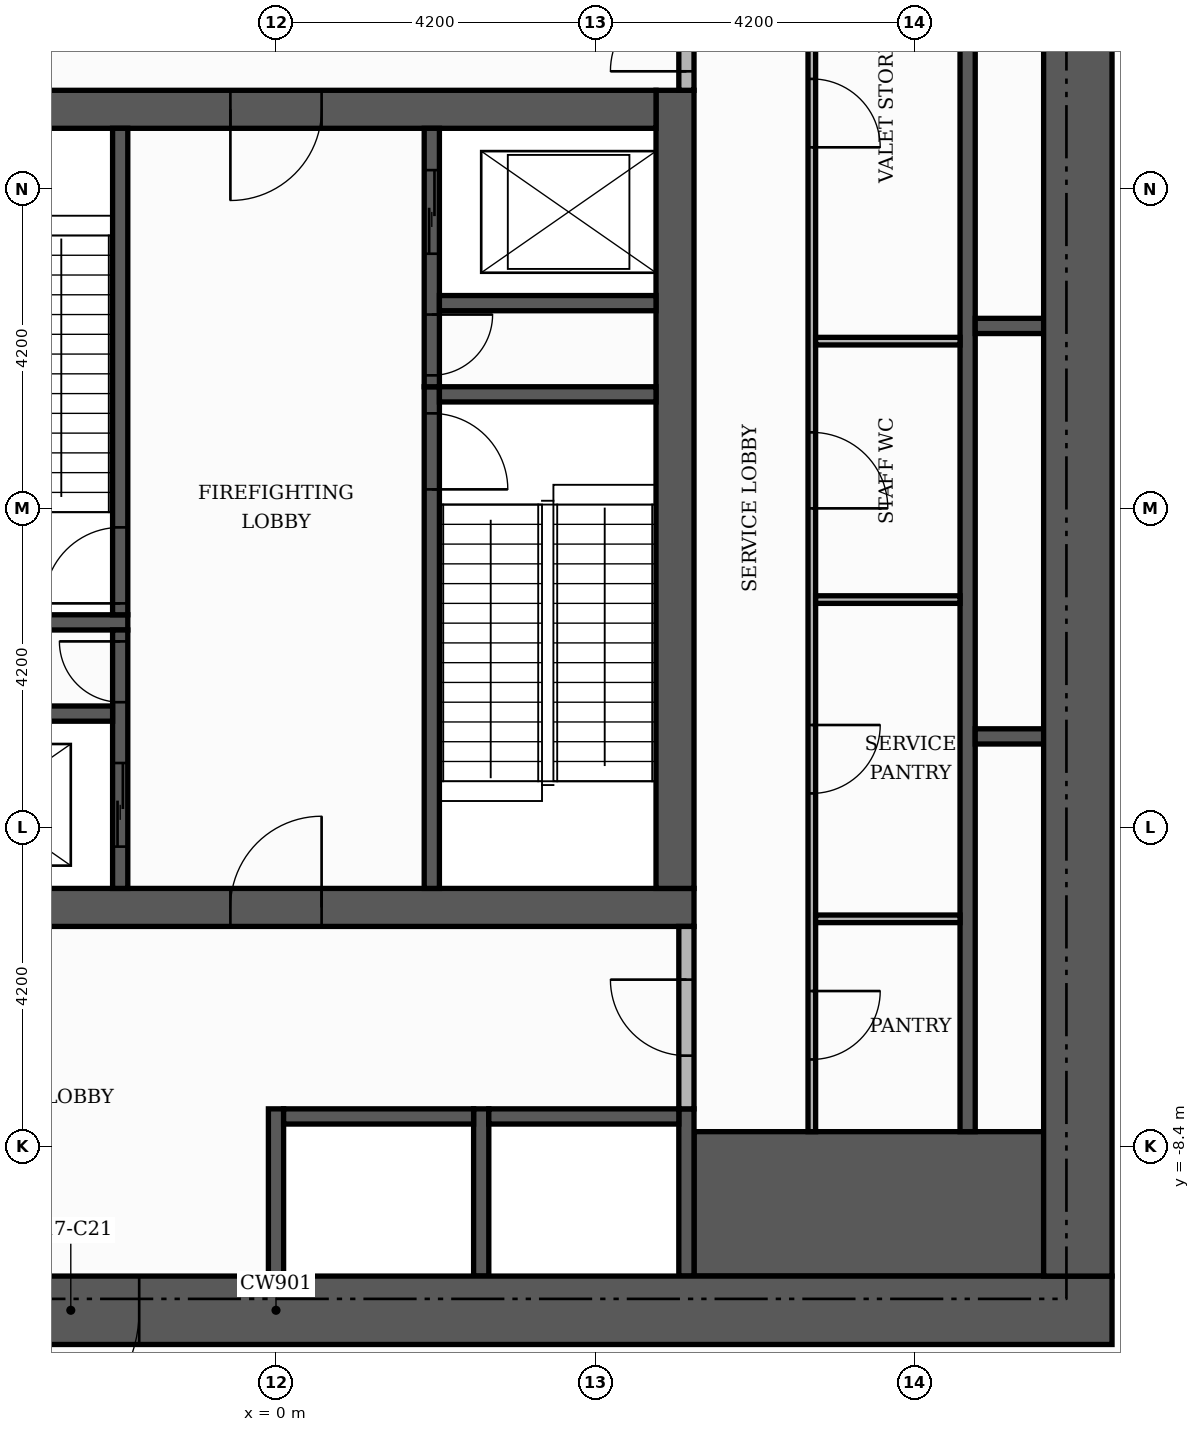
"""IFC4 building model, lengths in metres.
Left out: names, types, materials, properties, quantities, classifications, styles, units other than length and angle.
Written with IfcOpenShell. Run it as: python <this file> out.ifc"""

import sys

from ifc_helpers import new_model, si_unit, direction, frame, frame_2d, origin, place, context, subcontext, project, spatial, rectangle, extrude, element, fill, save


model = new_model("IFC4")
c1 = context("Model", 3, precision=1e-05, world=origin(), true_north=direction((0.0, 1.0)))
c2 = subcontext(c1, "Body", "Model", "MODEL_VIEW")
j1 = project(units=[si_unit("LENGTHUNIT", "METRE"), si_unit("PLANEANGLEUNIT", "RADIAN")], contexts=[c1])
p1 = place(None, origin())
s1 = spatial("IfcSite", under=j1, at=p1, CompositionType="ELEMENT")
p2 = place(p1, origin())
s2 = spatial("IfcBuilding", under=s1, at=p2, CompositionType="ELEMENT")
p3 = place(p2, frame((0.0, 0.0, 73.8)))
s3 = spatial("IfcBuildingStorey", under=s2, at=p3, CompositionType="ELEMENT", Elevation=73.8)
p4 = place(p3, frame((-5.5, -5.25, 0.0), z_axis=(0.0, 0.0, 1.0), x_axis=(1.0, 0.0, 0.0)))
e1 = element("IfcWall", 1, at=p4, inside=s3, PredefinedType="SHEAR", context=c2, shape_type="SweptSolid", body=[
    extrude(rectangle(XDim=11.0, YDim=0.5, at=frame_2d((5.5, 0.0))), origin(), (0.0, 0.0, 1.0), 4.98),
])
p5 = place(p4, frame((4.9, 0.0, 0.0)))
e2 = element("IfcOpeningElement", 2, at=p5, cuts=e1, PredefinedType="OPENING", context=c2, shape_type="SweptSolid", body=[
    extrude(rectangle(XDim=1.2, YDim=2.1, at=frame_2d((0.6, 1.05))), frame((0.0, 0.26, 0.0), z_axis=(0.0, -1.0, 0.0), x_axis=(1.0, 0.0, 0.0)), (0.0, 0.0, 1.0), 0.52),
])
p6 = place(p3, frame((5.25, -5.0, 0.0), z_axis=(0.0, 0.0, 1.0), x_axis=(0.0, 1.0, 0.0)))
e3 = element("IfcWall", 3, at=p6, inside=s3, PredefinedType="SHEAR", context=c2, shape_type="SweptSolid", body=[
    extrude(rectangle(XDim=10.5, YDim=0.5, at=frame_2d((5.25, 0.0))), origin(), (0.0, 0.0, 1.0), 4.98),
])
p7 = place(p3, frame((-5.0, 5.25, 0.0), z_axis=(0.0, 0.0, 1.0), x_axis=(1.0, 0.0, 0.0)))
e4 = element("IfcWall", 4, at=p7, inside=s3, PredefinedType="SHEAR", context=c2, shape_type="SweptSolid", body=[
    extrude(rectangle(XDim=10.0, YDim=0.5, at=frame_2d((5.0, 0.0))), origin(), (0.0, 0.0, 1.0), 4.98),
])
p8 = place(p7, frame((4.4, 0.0, 0.0)))
e5 = element("IfcOpeningElement", 5, at=p8, cuts=e4, PredefinedType="OPENING", context=c2, shape_type="SweptSolid", body=[
    extrude(rectangle(XDim=1.2, YDim=2.1, at=frame_2d((0.6, 1.05))), frame((0.0, 0.26, 0.0), z_axis=(0.0, -1.0, 0.0), x_axis=(1.0, 0.0, 0.0)), (0.0, 0.0, 1.0), 0.52),
])
p9 = place(p3, frame((5.5, -9.15, 0.0), z_axis=(0.0, 0.0, 1.0), x_axis=(1.0, 0.0, 0.0)))
e6 = element("IfcWall", 6, at=p9, inside=s3, PredefinedType="SHEAR", context=c2, shape_type="SweptSolid", body=[
    extrude(rectangle(XDim=4.6, YDim=1.9, at=frame_2d((2.3, 0.0))), origin(), (0.0, 0.0, 1.0), 4.98),
])
p10 = place(p3, frame((2.05, -5.0, 0.0), z_axis=(0.0, 0.0, 1.0), x_axis=(0.0, 1.0, 0.0)))
e7 = element("IfcWall", 7, at=p10, inside=s3, PredefinedType="SHEAR", context=c2, shape_type="SweptSolid", body=[
    extrude(rectangle(XDim=6.6, YDim=0.2, at=frame_2d((3.3, 0.0))), origin(), (0.0, 0.0, 1.0), 4.98),
])
p11 = place(p10, frame((5.25, 0.0, 0.0)))
e8 = element("IfcOpeningElement", 8, at=p11, cuts=e7, PredefinedType="OPENING", context=c2, shape_type="SweptSolid", body=[
    extrude(rectangle(XDim=1.0, YDim=2.1, at=frame_2d((0.5, 1.05))), frame((0.0, 0.11, 0.0), z_axis=(0.0, -1.0, 0.0), x_axis=(1.0, 0.0, 0.0)), (0.0, 0.0, 1.0), 0.22),
])
p12 = place(p3, frame((-5.0, -1.5, 0.0), z_axis=(0.0, 0.0, 1.0), x_axis=(1.0, 0.0, 0.0)))
e9 = element("IfcWall", 9, at=p12, inside=s3, PredefinedType="SHEAR", context=c2, shape_type="SweptSolid", body=[
    extrude(rectangle(XDim=3.05, YDim=0.2, at=frame_2d((1.525, 0.0))), origin(), (0.0, 0.0, 1.0), 4.98),
])
p13 = place(p3, frame((-2.05, -1.4, 0.0), z_axis=(0.0, 0.0, 1.0), x_axis=(0.0, 1.0, 0.0)))
e10 = element("IfcWall", 10, at=p13, inside=s3, PredefinedType="SHEAR", context=c2, shape_type="SweptSolid", body=[
    extrude(rectangle(XDim=6.4, YDim=0.2, at=frame_2d((3.2, 0.0))), origin(), (0.0, 0.0, 1.0), 4.98),
])
p14 = place(p13, frame((0.15, 0.0, 0.0)))
e11 = element("IfcOpeningElement", 11, at=p14, cuts=e10, PredefinedType="OPENING", context=c2, shape_type="SweptSolid", body=[
    extrude(rectangle(XDim=1.0, YDim=2.1, at=frame_2d((0.5, 1.05))), frame((0.0, 0.11, 0.0), z_axis=(0.0, -1.0, 0.0), x_axis=(1.0, 0.0, 0.0)), (0.0, 0.0, 1.0), 0.22),
])
p15 = place(p3, frame((2.15, 1.5, 0.0), z_axis=(0.0, 0.0, 1.0), x_axis=(1.0, 0.0, 0.0)))
e12 = element("IfcWall", 12, at=p15, inside=s3, PredefinedType="SHEAR", context=c2, shape_type="SweptSolid", body=[
    extrude(rectangle(XDim=2.85, YDim=0.2, at=frame_2d((1.425, 0.0))), origin(), (0.0, 0.0, 1.0), 4.98),
])
for number, where, z_axis, x_axis in (
    (13, (0.0, -10.1, 0.0), (0.0, 0.0, 1.0), (0.0, 1.0, 0.0)),
    (14, (2.7, -10.1, 0.0), (0.0, 0.0, 1.0), (0.0, 1.0, 0.0)),
    (15, (5.4, -10.1, 0.0), (0.0, 0.0, 1.0), (0.0, 1.0, 0.0)),
):
    element("IfcWall", number, at=place(p3, frame(where, z_axis=z_axis, x_axis=x_axis)), inside=s3, PredefinedType="SHEAR", context=c2, shape_type="SweptSolid", body=[
        extrude(rectangle(XDim=2.2, YDim=0.2, at=frame_2d((1.1, 0.0))), origin(), (0.0, 0.0, 1.0), 4.98),
    ])
p16 = place(p3, frame((9.1, -8.2, 0.0), z_axis=(0.0, 0.0, 1.0), x_axis=(0.0, 1.0, 0.0)))
e16 = element("IfcWall", 16, at=p16, inside=s3, PredefinedType="SHEAR", context=c2, shape_type="SweptSolid", body=[
    extrude(rectangle(XDim=16.4, YDim=0.2, at=frame_2d((8.2, 0.0))), origin(), (0.0, 0.0, 1.0), 4.98),
])
for number, where, z_axis, x_axis in (
    (17, (0.1, -8.0, 0.0), (0.0, 0.0, 1.0), (1.0, 0.0, 0.0)),
    (18, (2.8, -8.0, 0.0), (0.0, 0.0, 1.0), (1.0, 0.0, 0.0)),
):
    element("IfcWall", number, at=place(p3, frame(where, z_axis=z_axis, x_axis=x_axis)), inside=s3, PredefinedType="SHEAR", context=c2, shape_type="SweptSolid", body=[
        extrude(rectangle(XDim=2.5, YDim=0.2, at=frame_2d((1.25, 0.0))), origin(), (0.0, 0.0, 1.0), 4.98),
    ])
p17 = place(p3, frame((-2.05, -5.0, 0.0), z_axis=(0.0, 0.0, 1.0), x_axis=(0.0, 1.0, 0.0)))
e19 = element("IfcWall", 19, at=p17, inside=s3, PredefinedType="SHEAR", context=c2, shape_type="SweptSolid", body=[
    extrude(rectangle(XDim=3.4, YDim=0.2, at=frame_2d((1.7, 0.0))), origin(), (0.0, 0.0, 1.0), 4.98),
])
p18 = place(p17, frame((0.55, 0.0, 0.0)))
e20 = element("IfcOpeningElement", 20, at=p18, cuts=e19, PredefinedType="OPENING", context=c2, shape_type="SweptSolid", body=[
    extrude(rectangle(XDim=1.1, YDim=2.1, at=frame_2d((0.55, 1.05))), frame((0.0, 0.11, 0.0), z_axis=(0.0, -1.0, 0.0), x_axis=(1.0, 0.0, 0.0)), (0.0, 0.0, 1.0), 0.22),
])
p19 = place(p17, frame((2.45, 0.0, 0.0)))
e21 = element("IfcOpeningElement", 21, at=p19, cuts=e19, PredefinedType="OPENING", context=c2, shape_type="SweptSolid", body=[
    extrude(rectangle(XDim=0.8, YDim=2.1, at=frame_2d((0.4, 1.05))), frame((0.0, 0.11, 0.0), z_axis=(0.0, -1.0, 0.0), x_axis=(1.0, 0.0, 0.0)), (0.0, 0.0, 1.0), 0.22),
])
p20 = place(p3, frame((9.2, -3.0, 0.0), z_axis=(0.0, 0.0, 1.0), x_axis=(1.0, 0.0, 0.0)))
e22 = element("IfcWall", 22, at=p20, inside=s3, PredefinedType="SHEAR", context=c2, shape_type="SweptSolid", body=[
    extrude(rectangle(XDim=0.9, YDim=0.2, at=frame_2d((0.45, 0.0))), origin(), (0.0, 0.0, 1.0), 4.98),
])
p21 = place(p3, frame((-5.0, -2.7, 0.0), z_axis=(0.0, 0.0, 1.0), x_axis=(1.0, 0.0, 0.0)))
e23 = element("IfcWall", 23, at=p21, inside=s3, PredefinedType="SHEAR", context=c2, shape_type="SweptSolid", body=[
    extrude(rectangle(XDim=2.85, YDim=0.2, at=frame_2d((1.425, 0.0))), origin(), (0.0, 0.0, 1.0), 4.98),
])
p22 = place(p3, frame((2.05, 1.6, 0.0), z_axis=(0.0, 0.0, 1.0), x_axis=(0.0, 1.0, 0.0)))
e24 = element("IfcWall", 24, at=p22, inside=s3, PredefinedType="SHEAR", context=c2, shape_type="SweptSolid", body=[
    extrude(rectangle(XDim=3.4, YDim=0.2, at=frame_2d((1.7, 0.0))), origin(), (0.0, 0.0, 1.0), 4.98),
])
p23 = place(p22, frame((1.75, 0.0, 0.0)))
e25 = element("IfcOpeningElement", 25, at=p23, cuts=e24, PredefinedType="OPENING", context=c2, shape_type="SweptSolid", body=[
    extrude(rectangle(XDim=1.1, YDim=2.1, at=frame_2d((0.55, 1.05))), frame((0.0, 0.11, 0.0), z_axis=(0.0, -1.0, 0.0), x_axis=(1.0, 0.0, 0.0)), (0.0, 0.0, 1.0), 0.22),
])
p24 = place(p22, frame((0.15, 0.0, 0.0)))
e26 = element("IfcOpeningElement", 26, at=p24, cuts=e24, PredefinedType="OPENING", context=c2, shape_type="SweptSolid", body=[
    extrude(rectangle(XDim=0.8, YDim=2.1, at=frame_2d((0.4, 1.05))), frame((0.0, 0.11, 0.0), z_axis=(0.0, -1.0, 0.0), x_axis=(1.0, 0.0, 0.0)), (0.0, 0.0, 1.0), 0.22),
])
p25 = place(p3, frame((9.2, 2.4, 0.0), z_axis=(0.0, 0.0, 1.0), x_axis=(1.0, 0.0, 0.0)))
e27 = element("IfcWall", 27, at=p25, inside=s3, PredefinedType="SHEAR", context=c2, shape_type="SweptSolid", body=[
    extrude(rectangle(XDim=0.9, YDim=0.2, at=frame_2d((0.45, 0.0))), origin(), (0.0, 0.0, 1.0), 4.98),
])
p26 = place(p3, frame((2.15, 2.7, 0.0), z_axis=(0.0, 0.0, 1.0), x_axis=(1.0, 0.0, 0.0)))
e28 = element("IfcWall", 28, at=p26, inside=s3, PredefinedType="SHEAR", context=c2, shape_type="SweptSolid", body=[
    extrude(rectangle(XDim=2.85, YDim=0.2, at=frame_2d((1.425, 0.0))), origin(), (0.0, 0.0, 1.0), 4.98),
])
p27 = place(p3, frame((-11.0, -10.55, 0.0), z_axis=(0.0, 0.0, 1.0), x_axis=(1.0, 0.0, 0.0)))
e29 = element("IfcWall", 29, at=p27, inside=s3, PredefinedType="SHEAR", context=c2, shape_type="SweptSolid", body=[
    extrude(rectangle(XDim=22.0, YDim=0.9, at=frame_2d((11.0, 0.0))), origin(), (0.0, 0.0, 1.0), 4.98),
])
p28 = place(p27, frame((7.4, 0.0, 0.0)))
e30 = element("IfcOpeningElement", 30, at=p28, cuts=e29, PredefinedType="OPENING", context=c2, shape_type="SweptSolid", body=[
    extrude(rectangle(XDim=1.8, YDim=2.2, at=frame_2d((0.9, 1.1))), frame((0.0, 0.46, 0.0), z_axis=(0.0, -1.0, 0.0), x_axis=(1.0, 0.0, 0.0)), (0.0, 0.0, 1.0), 0.92),
])
p29 = place(p3, frame((10.55, -10.1, 0.0), z_axis=(0.0, 0.0, 1.0), x_axis=(0.0, 1.0, 0.0)))
e31 = element("IfcWall", 31, at=p29, inside=s3, PredefinedType="SHEAR", context=c2, shape_type="SweptSolid", body=[
    extrude(rectangle(XDim=20.2, YDim=0.9, at=frame_2d((10.1, 0.0))), origin(), (0.0, 0.0, 1.0), 4.98),
])
p30 = place(p3, frame((7.05, -8.2, 0.0), z_axis=(0.0, 0.0, 1.0), x_axis=(0.0, 1.0, 0.0)))
e32 = element("IfcWall", 32, at=p30, inside=s3, PredefinedType="PARTITIONING", context=c2, shape_type="SweptSolid", body=[
    extrude(rectangle(XDim=16.4, YDim=0.1, at=frame_2d((8.2, 0.0))), origin(), (0.0, 0.0, 1.0), 4.98),
])
p31 = place(p30, frame((0.95, 0.0, 0.0)))
e33 = element("IfcOpeningElement", 33, at=p31, cuts=e32, PredefinedType="OPENING", context=c2, shape_type="SweptSolid", body=[
    extrude(rectangle(XDim=0.9, YDim=2.1, at=frame_2d((0.45, 1.05))), frame((0.0, 0.06, 0.0), z_axis=(0.0, -1.0, 0.0), x_axis=(1.0, 0.0, 0.0)), (0.0, 0.0, 1.0), 0.12),
])
p32 = place(p30, frame((4.45, 0.0, 0.0)))
e34 = element("IfcOpeningElement", 34, at=p32, cuts=e32, PredefinedType="OPENING", context=c2, shape_type="SweptSolid", body=[
    extrude(rectangle(XDim=0.9, YDim=2.1, at=frame_2d((0.45, 1.05))), frame((0.0, 0.06, 0.0), z_axis=(0.0, -1.0, 0.0), x_axis=(1.0, 0.0, 0.0)), (0.0, 0.0, 1.0), 0.12),
])
p33 = place(p30, frame((8.2, 0.0, 0.0)))
e35 = element("IfcOpeningElement", 35, at=p33, cuts=e32, PredefinedType="OPENING", context=c2, shape_type="SweptSolid", body=[
    extrude(rectangle(XDim=1.0, YDim=2.1, at=frame_2d((0.5, 1.05))), frame((0.0, 0.06, 0.0), z_axis=(0.0, -1.0, 0.0), x_axis=(1.0, 0.0, 0.0)), (0.0, 0.0, 1.0), 0.12),
])
p34 = place(p30, frame((12.95, 0.0, 0.0)))
e36 = element("IfcOpeningElement", 36, at=p34, cuts=e32, PredefinedType="OPENING", context=c2, shape_type="SweptSolid", body=[
    extrude(rectangle(XDim=0.9, YDim=2.1, at=frame_2d((0.45, 1.05))), frame((0.0, 0.06, 0.0), z_axis=(0.0, -1.0, 0.0), x_axis=(1.0, 0.0, 0.0)), (0.0, 0.0, 1.0), 0.12),
])
p35 = place(p3, frame((5.4, -7.9, 0.0), z_axis=(0.0, 0.0, 1.0), x_axis=(0.0, 1.0, 0.0)))
e37 = element("IfcWall", 37, at=p35, inside=s3, PredefinedType="PARTITIONING", context=c2, shape_type="SweptSolid", body=[
    extrude(rectangle(XDim=2.4, YDim=0.2, at=frame_2d((1.2, 0.0))), origin(), (0.0, 0.0, 1.0), 4.98),
])
p36 = place(p35, frame((0.7, 0.0, 0.0)))
e38 = element("IfcOpeningElement", 38, at=p36, cuts=e37, PredefinedType="OPENING", context=c2, shape_type="SweptSolid", body=[
    extrude(rectangle(XDim=1.0, YDim=2.1, at=frame_2d((0.5, 1.05))), frame((0.0, 0.11, 0.0), z_axis=(0.0, -1.0, 0.0), x_axis=(1.0, 0.0, 0.0)), (0.0, 0.0, 1.0), 0.22),
])
for number, where, z_axis, x_axis in (
    (39, (7.1, -5.4, 0.0), (0.0, 0.0, 1.0), (1.0, 0.0, 0.0)),
    (40, (7.1, -1.2, 0.0), (0.0, 0.0, 1.0), (1.0, 0.0, 0.0)),
    (41, (7.1, 2.2, 0.0), (0.0, 0.0, 1.0), (1.0, 0.0, 0.0)),
):
    element("IfcWall", number, at=place(p3, frame(where, z_axis=z_axis, x_axis=x_axis)), inside=s3, PredefinedType="PARTITIONING", context=c2, shape_type="SweptSolid", body=[
        extrude(rectangle(XDim=1.9, YDim=0.1, at=frame_2d((0.95, 0.0))), origin(), (0.0, 0.0, 1.0), 4.98),
    ])
p37 = place(p3, frame((5.4, 5.5, 0.0), z_axis=(0.0, 0.0, 1.0), x_axis=(0.0, 1.0, 0.0)))
e42 = element("IfcWall", 42, at=p37, inside=s3, PredefinedType="PARTITIONING", context=c2, shape_type="SweptSolid", body=[
    extrude(rectangle(XDim=4.6, YDim=0.2, at=frame_2d((2.3, 0.0))), origin(), (0.0, 0.0, 1.0), 4.98),
])
p38 = place(p37, frame((0.25, 0.0, 0.0)))
e43 = element("IfcOpeningElement", 43, at=p38, cuts=e42, PredefinedType="OPENING", context=c2, shape_type="SweptSolid", body=[
    extrude(rectangle(XDim=1.0, YDim=2.1, at=frame_2d((0.5, 1.05))), frame((0.0, 0.11, 0.0), z_axis=(0.0, -1.0, 0.0), x_axis=(1.0, 0.0, 0.0)), (0.0, 0.0, 1.0), 0.22),
])
p39 = place(p23, origin())
e44 = element("IfcDoor", 44, at=p39, inside=s3, OperationType="SLIDING_TO_LEFT", PredefinedType="DOOR", context=c2, shape_type="SweptSolid", body=[
    extrude(rectangle(XDim=1.1, YDim=2.1, at=frame_2d((0.55, 1.05))), frame((0.0, 0.025, 0.0), z_axis=(0.0, -1.0, 0.0), x_axis=(1.0, 0.0, 0.0)), (0.0, 0.0, 1.0), 0.05),
])
fill(e25, e44)
p40 = place(p18, origin())
e45 = element("IfcDoor", 45, at=p40, inside=s3, OperationType="SLIDING_TO_LEFT", PredefinedType="DOOR", context=c2, shape_type="SweptSolid", body=[
    extrude(rectangle(XDim=1.1, YDim=2.1, at=frame_2d((0.55, 1.05))), frame((0.0, 0.025, 0.0), z_axis=(0.0, -1.0, 0.0), x_axis=(1.0, 0.0, 0.0)), (0.0, 0.0, 1.0), 0.05),
])
fill(e20, e45)
p41 = place(p14, origin())
e46 = element("IfcDoor", 46, at=p41, inside=s3, OperationType="SINGLE_SWING_LEFT", PredefinedType="DOOR", context=c2, shape_type="SweptSolid", body=[
    extrude(rectangle(XDim=1.0, YDim=2.1, at=frame_2d((0.5, 1.05))), frame((0.0, 0.025, 0.0), z_axis=(0.0, -1.0, 0.0), x_axis=(1.0, 0.0, 0.0)), (0.0, 0.0, 1.0), 0.05),
])
fill(e11, e46)
p42 = place(p11, frame((1.0, 0.0, 0.0), z_axis=(0.0, 0.0, 1.0), x_axis=(-1.0, 0.0, 0.0)))
e47 = element("IfcDoor", 47, at=p42, inside=s3, OperationType="SINGLE_SWING_LEFT", PredefinedType="DOOR", context=c2, shape_type="SweptSolid", body=[
    extrude(rectangle(XDim=1.0, YDim=2.1, at=frame_2d((0.5, 1.05))), frame((0.0, 0.025, 0.0), z_axis=(0.0, -1.0, 0.0), x_axis=(1.0, 0.0, 0.0)), (0.0, 0.0, 1.0), 0.05),
])
fill(e8, e47)
p43 = place(p24, frame((0.8, 0.0, 0.0), z_axis=(0.0, 0.0, 1.0), x_axis=(-1.0, 0.0, 0.0)))
e48 = element("IfcDoor", 48, at=p43, inside=s3, OperationType="SINGLE_SWING_RIGHT", PredefinedType="DOOR", context=c2, shape_type="SweptSolid", body=[
    extrude(rectangle(XDim=0.8, YDim=2.1, at=frame_2d((0.4, 1.05))), frame((0.0, 0.025, 0.0), z_axis=(0.0, -1.0, 0.0), x_axis=(1.0, 0.0, 0.0)), (0.0, 0.0, 1.0), 0.05),
])
fill(e26, e48)
p44 = place(p19, origin())
e49 = element("IfcDoor", 49, at=p44, inside=s3, OperationType="SINGLE_SWING_RIGHT", PredefinedType="DOOR", context=c2, shape_type="SweptSolid", body=[
    extrude(rectangle(XDim=0.8, YDim=2.1, at=frame_2d((0.4, 1.05))), frame((0.0, 0.025, 0.0), z_axis=(0.0, -1.0, 0.0), x_axis=(1.0, 0.0, 0.0)), (0.0, 0.0, 1.0), 0.05),
])
fill(e21, e49)
p45 = place(p8, frame((1.2, 0.0, 0.0), z_axis=(0.0, 0.0, 1.0), x_axis=(-1.0, 0.0, 0.0)))
e50 = element("IfcDoor", 50, at=p45, inside=s3, OperationType="SINGLE_SWING_LEFT", PredefinedType="DOOR", context=c2, shape_type="SweptSolid", body=[
    extrude(rectangle(XDim=1.2, YDim=2.1, at=frame_2d((0.6, 1.05))), frame((0.0, 0.025, 0.0), z_axis=(0.0, -1.0, 0.0), x_axis=(1.0, 0.0, 0.0)), (0.0, 0.0, 1.0), 0.05),
])
fill(e5, e50)
p46 = place(p5, origin())
e51 = element("IfcDoor", 51, at=p46, inside=s3, OperationType="SINGLE_SWING_RIGHT", PredefinedType="DOOR", context=c2, shape_type="SweptSolid", body=[
    extrude(rectangle(XDim=1.2, YDim=2.1, at=frame_2d((0.6, 1.05))), frame((0.0, 0.025, 0.0), z_axis=(0.0, -1.0, 0.0), x_axis=(1.0, 0.0, 0.0)), (0.0, 0.0, 1.0), 0.05),
])
fill(e2, e51)
p47 = place(p38, origin())
e52 = element("IfcDoor", 52, at=p47, inside=s3, OperationType="SINGLE_SWING_LEFT", PredefinedType="DOOR", context=c2, shape_type="SweptSolid", body=[
    extrude(rectangle(XDim=1.0, YDim=2.1, at=frame_2d((0.5, 1.05))), frame((0.0, 0.025, 0.0), z_axis=(0.0, -1.0, 0.0), x_axis=(1.0, 0.0, 0.0)), (0.0, 0.0, 1.0), 0.05),
])
fill(e43, e52)
p48 = place(p36, origin())
e53 = element("IfcDoor", 53, at=p48, inside=s3, OperationType="SINGLE_SWING_RIGHT", PredefinedType="DOOR", context=c2, shape_type="SweptSolid", body=[
    extrude(rectangle(XDim=1.0, YDim=2.1, at=frame_2d((0.5, 1.05))), frame((0.0, 0.025, 0.0), z_axis=(0.0, -1.0, 0.0), x_axis=(1.0, 0.0, 0.0)), (0.0, 0.0, 1.0), 0.05),
])
fill(e38, e53)
p49 = place(p28, frame((1.8, 0.0, 0.0), z_axis=(0.0, 0.0, 1.0), x_axis=(-1.0, 0.0, 0.0)))
e54 = element("IfcDoor", 54, at=p49, inside=s3, OperationType="DOUBLE_DOOR_SINGLE_SWING", PredefinedType="DOOR", context=c2, shape_type="SweptSolid", body=[
    extrude(rectangle(XDim=1.8, YDim=2.2, at=frame_2d((0.9, 1.1))), frame((0.0, 0.025, 0.0), z_axis=(0.0, -1.0, 0.0), x_axis=(1.0, 0.0, 0.0)), (0.0, 0.0, 1.0), 0.05),
])
fill(e30, e54)
p50 = place(p31, frame((0.9, 0.0, 0.0), z_axis=(0.0, 0.0, 1.0), x_axis=(-1.0, 0.0, 0.0)))
e55 = element("IfcDoor", 55, at=p50, inside=s3, OperationType="SINGLE_SWING_RIGHT", PredefinedType="DOOR", context=c2, shape_type="SweptSolid", body=[
    extrude(rectangle(XDim=0.9, YDim=2.1, at=frame_2d((0.45, 1.05))), frame((0.0, 0.025, 0.0), z_axis=(0.0, -1.0, 0.0), x_axis=(1.0, 0.0, 0.0)), (0.0, 0.0, 1.0), 0.05),
])
fill(e33, e55)
p51 = place(p32, frame((0.9, 0.0, 0.0), z_axis=(0.0, 0.0, 1.0), x_axis=(-1.0, 0.0, 0.0)))
e56 = element("IfcDoor", 56, at=p51, inside=s3, OperationType="SINGLE_SWING_RIGHT", PredefinedType="DOOR", context=c2, shape_type="SweptSolid", body=[
    extrude(rectangle(XDim=0.9, YDim=2.1, at=frame_2d((0.45, 1.05))), frame((0.0, 0.025, 0.0), z_axis=(0.0, -1.0, 0.0), x_axis=(1.0, 0.0, 0.0)), (0.0, 0.0, 1.0), 0.05),
])
fill(e34, e56)
p52 = place(p33, frame((1.0, 0.0, 0.0), z_axis=(0.0, 0.0, 1.0), x_axis=(-1.0, 0.0, 0.0)))
e57 = element("IfcDoor", 57, at=p52, inside=s3, OperationType="SINGLE_SWING_LEFT", PredefinedType="DOOR", context=c2, shape_type="SweptSolid", body=[
    extrude(rectangle(XDim=1.0, YDim=2.1, at=frame_2d((0.5, 1.05))), frame((0.0, 0.025, 0.0), z_axis=(0.0, -1.0, 0.0), x_axis=(1.0, 0.0, 0.0)), (0.0, 0.0, 1.0), 0.05),
])
fill(e35, e57)
p53 = place(p34, frame((0.9, 0.0, 0.0), z_axis=(0.0, 0.0, 1.0), x_axis=(-1.0, 0.0, 0.0)))
e58 = element("IfcDoor", 58, at=p53, inside=s3, OperationType="SINGLE_SWING_LEFT", PredefinedType="DOOR", context=c2, shape_type="SweptSolid", body=[
    extrude(rectangle(XDim=0.9, YDim=2.1, at=frame_2d((0.45, 1.05))), frame((0.0, 0.025, 0.0), z_axis=(0.0, -1.0, 0.0), x_axis=(1.0, 0.0, 0.0)), (0.0, 0.0, 1.0), 0.05),
])
fill(e36, e58)
save(model, sys.argv[1])
